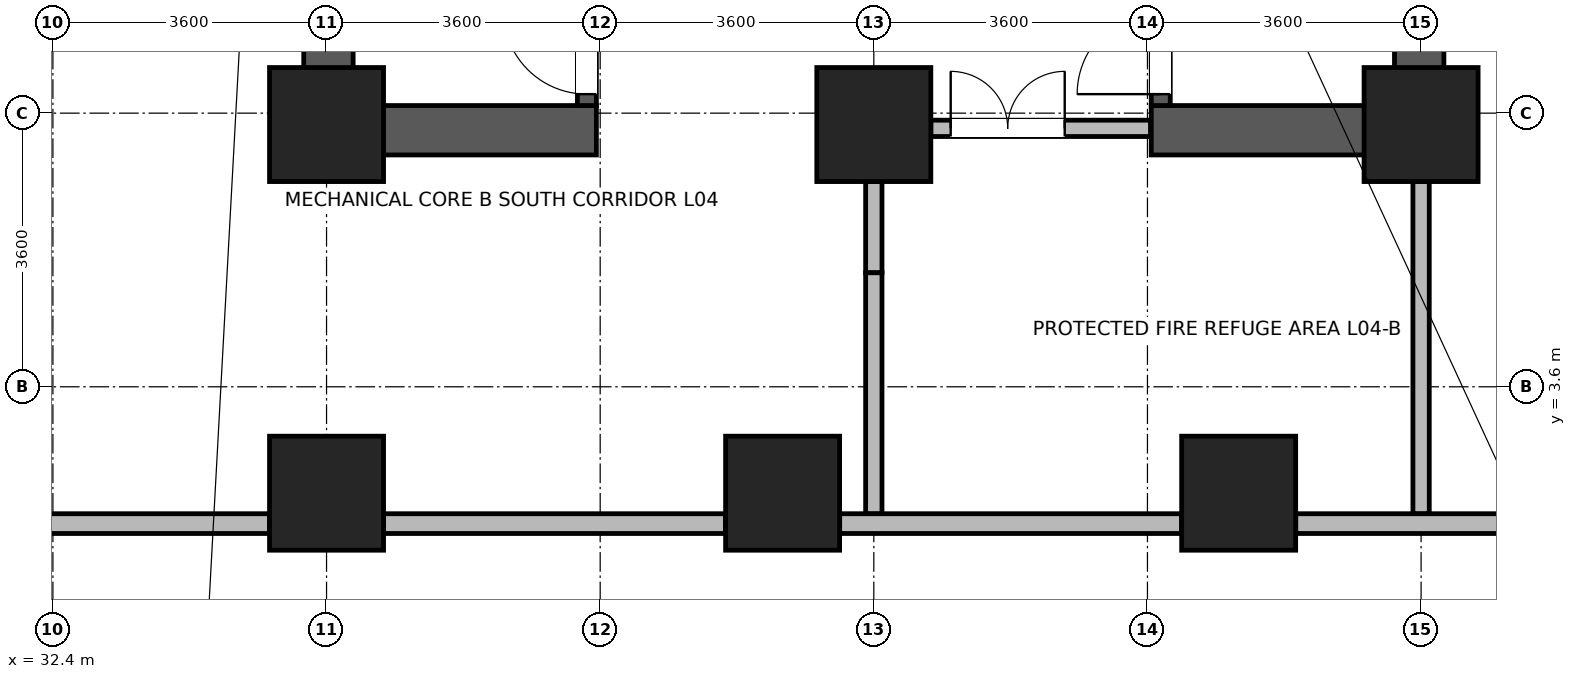
"""IFC4 building model, lengths in metres.
Left out: names, types, materials, properties, quantities, classifications, styles, units other than length and angle.
Written with IfcOpenShell. Run it as: python <this file> out.ifc"""

import sys

from ifc_helpers import new_model, si_unit, direction, frame, frame_2d, origin, origin_2d, place, context, subcontext, project, spatial, rectangle, extrude, source, transform, mapped, element, fill, save


model = new_model("IFC4")
c1 = context("Model", 3, precision=1e-05, world=origin(), true_north=direction((0.0, 1.0)))
c2 = subcontext(c1, "Body", "Model", "MODEL_VIEW")
j1 = project(units=[si_unit("LENGTHUNIT", "METRE"), si_unit("PLANEANGLEUNIT", "RADIAN")], contexts=[c1])
p1 = place(None, origin())
s1 = spatial("IfcSite", under=j1, at=p1, CompositionType="ELEMENT")
p2 = place(p1, origin())
s2 = spatial("IfcBuilding", under=s1, at=p2, CompositionType="ELEMENT")
p3 = place(p2, frame((0.0, 0.0, 19.8)))
s3 = spatial("IfcBuildingStorey", under=s2, at=p3, CompositionType="ELEMENT", Elevation=19.8)
for number, where, z_axis, x_axis in (
    (1, (36.025, 6.65, 0.0), (0.0, 0.0, 1.0), (0.0, 1.0, 0.0)),
    (2, (50.375, 6.65, 0.0), (0.0, 0.0, 1.0), (0.0, 1.0, 0.0)),
):
    element("IfcWall", number, at=place(p3, frame(where, z_axis=z_axis, x_axis=x_axis)), inside=s3, PredefinedType="SHEAR", context=c2, shape_type="SweptSolid", body=[
        extrude(rectangle(XDim=8.3, YDim=0.65, at=frame_2d((4.15, 0.0))), origin(), (0.0, 0.0, 1.0), 5.08),
    ])
for number, where, z_axis, x_axis in (
    (3, (36.35, 6.975, 0.0), (0.0, 0.0, 1.0), (1.0, 0.0, 0.0)),
    (4, (46.85, 6.975, 0.0), (0.0, 0.0, 1.0), (1.0, 0.0, 0.0)),
):
    element("IfcWall", number, at=place(p3, frame(where, z_axis=z_axis, x_axis=x_axis)), inside=s3, PredefinedType="SHEAR", context=c2, shape_type="SweptSolid", body=[
        extrude(rectangle(XDim=3.2, YDim=0.65, at=frame_2d((1.6, 0.0))), origin(), (0.0, 0.0, 1.0), 5.08),
    ])
p4 = place(p3, frame((39.425, 7.3, 0.0), z_axis=(0.0, 0.0, 1.0), x_axis=(0.0, 1.0, 0.0)))
e5 = element("IfcWall", 5, at=p4, inside=s3, PredefinedType="SHEAR", context=c2, shape_type="SweptSolid", body=[
    extrude(rectangle(XDim=7.0, YDim=0.25, at=frame_2d((3.5, 0.0))), origin(), (0.0, 0.0, 1.0), 5.08),
])
p5 = place(p4, frame((0.15, 0.0, 0.0)))
e6 = element("IfcOpeningElement", 6, at=p5, cuts=e5, PredefinedType="OPENING", context=c2, shape_type="SweptSolid", body=[
    extrude(rectangle(XDim=1.1, YDim=2.08, at=frame_2d((0.55, 1.04))), frame((0.0, 0.135, 0.0), z_axis=(0.0, -1.0, 0.0), x_axis=(1.0, 0.0, 0.0)), (0.0, 0.0, 1.0), 0.27),
])
p6 = place(p3, frame((46.975, 7.3, 0.0), z_axis=(0.0, 0.0, 1.0), x_axis=(0.0, 1.0, 0.0)))
e7 = element("IfcWall", 7, at=p6, inside=s3, PredefinedType="SHEAR", context=c2, shape_type="SweptSolid", body=[
    extrude(rectangle(XDim=7.0, YDim=0.25, at=frame_2d((3.5, 0.0))), origin(), (0.0, 0.0, 1.0), 5.08),
])
p7 = place(p6, frame((0.15, 0.0, 0.0)))
e8 = element("IfcOpeningElement", 8, at=p7, cuts=e7, PredefinedType="OPENING", context=c2, shape_type="SweptSolid", body=[
    extrude(rectangle(XDim=1.1, YDim=2.08, at=frame_2d((0.55, 1.04))), frame((0.0, 0.135, 0.0), z_axis=(0.0, -1.0, 0.0), x_axis=(1.0, 0.0, 0.0)), (0.0, 0.0, 1.0), 0.27),
])
m1 = source(origin(), c2, "Body", "SweptSolid", [
    extrude(rectangle(XDim=1.5, YDim=1.5, at=origin_2d()), origin(), (0.0, 0.0, 1.0), 5.5),
])
for number, where, z_axis, x_axis in (
    (9, (36.0, 7.05, 0.0), (0.0, 0.0, 1.0), (1.0, 0.0, 0.0)),
    (10, (43.2, 7.05, 0.0), (0.0, 0.0, 1.0), (1.0, 0.0, 0.0)),
    (11, (50.4, 7.05, 0.0), (0.0, 0.0, 1.0), (1.0, 0.0, 0.0)),
    (12, (48.0, 2.2, 0.0), (0.0, 0.0, 1.0), (1.0, 0.0, 0.0)),
    (13, (42.0, 2.2, 0.0), (0.0, 0.0, 1.0), (1.0, 0.0, 0.0)),
    (14, (36.0, 2.2, 0.0), (0.0, 0.0, 1.0), (1.0, 0.0, 0.0)),
):
    element("IfcColumn", number, at=place(p3, frame(where, z_axis=z_axis, x_axis=x_axis)), inside=s3, PredefinedType="COLUMN", context=c2, shape_type="MappedRepresentation", body=[
        mapped(m1, transform((0.0, 0.0, 0.0), x_axis=(1.0, 0.0, 0.0), y_axis=(0.0, 1.0, 0.0), z_axis=(0.0, 0.0, 1.0), scale=1.0)),
    ])
for number, where, z_axis, x_axis in (
    (15, (35.249, 1.8, 0.0), (0.0, 0.0, 1.0), (-1.0, 0.0, 0.0)),
    (16, (41.249, 1.8, 0.0), (0.0, 0.0, 1.0), (-1.0, 0.0, 0.0)),
    (17, (47.249, 1.8, 0.0), (0.0, 0.0, 1.0), (-1.0, 0.0, 0.0)),
):
    element("IfcWall", number, at=place(p3, frame(where, z_axis=z_axis, x_axis=x_axis)), inside=s3, PredefinedType="STANDARD", context=c2, shape_type="SweptSolid", body=[
        extrude(rectangle(XDim=4.498, YDim=0.26, at=frame_2d((2.249, 0.0))), origin(), (0.0, 0.0, 1.0), 5.06),
    ])
p8 = place(p3, frame((55.249, 1.8, 0.0), z_axis=(0.0, 0.0, 1.0), x_axis=(-1.0, 0.0, 0.0)))
e18 = element("IfcWall", 18, at=p8, inside=s3, PredefinedType="STANDARD", context=c2, shape_type="SweptSolid", body=[
    extrude(rectangle(XDim=6.498, YDim=0.26, at=frame_2d((3.249, 0.0))), origin(), (0.0, 0.0, 1.0), 5.06),
])
p9 = place(p3, frame((43.95, 7.0, 0.0), z_axis=(0.0, 0.0, 1.0), x_axis=(1.0, 0.0, 0.0)))
e19 = element("IfcWall", 19, at=p9, inside=s3, PredefinedType="PARTITIONING", context=c2, shape_type="SweptSolid", body=[
    extrude(rectangle(XDim=2.89, YDim=0.215, at=frame_2d((1.445, 0.0))), origin(), (0.0, 0.0, 1.0), 3.86),
])
p10 = place(p9, frame((0.261, 0.0, 0.0)))
e20 = element("IfcOpeningElement", 20, at=p10, cuts=e19, PredefinedType="OPENING", context=c2, shape_type="SweptSolid", body=[
    extrude(rectangle(XDim=1.5, YDim=2.1, at=frame_2d((0.75, 1.05))), frame((0.0, 0.118, 0.0), z_axis=(0.0, -1.0, 0.0), x_axis=(1.0, 0.0, 0.0)), (0.0, 0.0, 1.0), 0.235),
])
p11 = place(p3, frame((43.2, 5.1, 0.0), z_axis=(0.0, 0.0, 1.0), x_axis=(0.0, 1.0, 0.0)))
e21 = element("IfcWall", 21, at=p11, inside=s3, PredefinedType="PARTITIONING", context=c2, shape_type="SweptSolid", body=[
    extrude(rectangle(XDim=1.2, YDim=0.215, at=frame_2d((0.6, 0.0))), origin(), (0.0, 0.0, 1.0), 5.06),
])
p12 = place(p3, frame((50.4, 1.932, 0.0), z_axis=(0.0, 0.0, 1.0), x_axis=(0.0, 1.0, 0.0)))
e22 = element("IfcWall", 22, at=p12, inside=s3, PredefinedType="PARTITIONING", context=c2, shape_type="SweptSolid", body=[
    extrude(rectangle(XDim=4.368, YDim=0.215, at=frame_2d((2.184, 0.0))), origin(), (0.0, 0.0, 1.0), 5.06),
])
p13 = place(p3, frame((43.2, 1.932, 0.0), z_axis=(0.0, 0.0, 1.0), x_axis=(0.0, 1.0, 0.0)))
e23 = element("IfcWall", 23, at=p13, inside=s3, PredefinedType="PARTITIONING", context=c2, shape_type="SweptSolid", body=[
    extrude(rectangle(XDim=3.168, YDim=0.215, at=frame_2d((1.584, 0.0))), origin(), (0.0, 0.0, 1.0), 5.06),
])
p14 = place(p5, origin())
e24 = element("IfcDoor", 24, at=p14, inside=s3, OperationType="SINGLE_SWING_RIGHT", PredefinedType="DOOR", context=c2, shape_type="SweptSolid", body=[
    extrude(rectangle(XDim=1.1, YDim=2.08, at=frame_2d((0.55, 1.04))), frame((0.0, 0.025, 0.0), z_axis=(0.0, -1.0, 0.0), x_axis=(1.0, 0.0, 0.0)), (0.0, 0.0, 1.0), 0.05),
])
fill(e6, e24)
p15 = place(p7, origin())
e25 = element("IfcDoor", 25, at=p15, inside=s3, OperationType="SINGLE_SWING_LEFT", PredefinedType="DOOR", context=c2, shape_type="SweptSolid", body=[
    extrude(rectangle(XDim=1.1, YDim=2.08, at=frame_2d((0.55, 1.04))), frame((0.0, 0.025, 0.0), z_axis=(0.0, -1.0, 0.0), x_axis=(1.0, 0.0, 0.0)), (0.0, 0.0, 1.0), 0.05),
])
fill(e8, e25)
p16 = place(p10, origin())
e26 = element("IfcDoor", 26, at=p16, inside=s3, OperationType="DOUBLE_DOOR_SINGLE_SWING", PredefinedType="DOOR", context=c2, shape_type="SweptSolid", body=[
    extrude(rectangle(XDim=1.5, YDim=2.1, at=frame_2d((0.75, 1.05))), frame((0.0, 0.025, 0.0), z_axis=(0.0, -1.0, 0.0), x_axis=(1.0, 0.0, 0.0)), (0.0, 0.0, 1.0), 0.05),
])
fill(e20, e26)
save(model, sys.argv[1])
